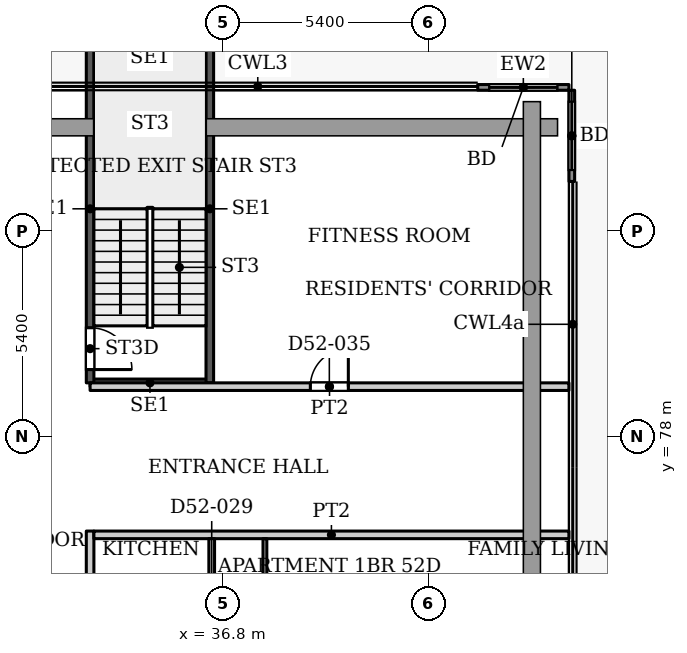
"""IFC4 building model, lengths in metres.
Left out: names, types, materials, properties, quantities, classifications, styles, units other than length and angle.
Written with IfcOpenShell. Run it as: python <this file> out.ifc"""

import sys

from ifc_helpers import new_model, si_unit, direction, frame, frame_2d, origin, place, context, subcontext, project, spatial, rectangle, extrude, source, transform, mapped, element, fill, save


model = new_model("IFC4")
c1 = context("Model", 3, precision=1e-05, world=origin(), true_north=direction((0.0, 1.0)))
c2 = subcontext(c1, "Body", "Model", "MODEL_VIEW")
j1 = project(units=[si_unit("LENGTHUNIT", "METRE"), si_unit("PLANEANGLEUNIT", "RADIAN")], contexts=[c1])
p1 = place(None, origin())
s1 = spatial("IfcSite", under=j1, at=p1, CompositionType="ELEMENT")
p2 = place(p1, origin())
s2 = spatial("IfcBuilding", under=s1, at=p2, CompositionType="ELEMENT")
p3 = place(p2, frame((0.0, 0.0, 224.0)))
s3 = spatial("IfcBuildingStorey", under=s2, at=p3, CompositionType="ELEMENT", Elevation=224.0)
p4 = place(p3, frame((43.5, 87.175, 0.0), z_axis=(0.0, 0.0, 1.0), x_axis=(1.0, 0.0, 0.0)))
e1 = element("IfcWall", 1, at=p4, inside=s3, PredefinedType="SOLIDWALL", context=c2, shape_type="SweptSolid", body=[
    extrude(rectangle(XDim=2.4, YDim=0.15, at=frame_2d((1.2, 0.0))), origin(), (0.0, 0.0, 1.0), 3.75),
])
p5 = place(p4, frame((0.3, 0.0, 0.0)))
e2 = element("IfcOpeningElement", 2, at=p5, cuts=e1, PredefinedType="OPENING", context=c2, shape_type="SweptSolid", body=[
    extrude(rectangle(XDim=1.8, YDim=2.4, at=frame_2d((0.9, 1.2))), frame((0.0, 0.085, 0.0), z_axis=(0.0, -1.0, 0.0), x_axis=(1.0, 0.0, 0.0)), (0.0, 0.0, 1.0), 0.17),
])
p6 = place(p3, frame((45.975, 87.1, 0.0), z_axis=(0.0, 0.0, 1.0), x_axis=(0.0, -1.0, 0.0)))
e3 = element("IfcWall", 3, at=p6, inside=s3, PredefinedType="SOLIDWALL", context=c2, shape_type="SweptSolid", body=[
    extrude(rectangle(XDim=2.4, YDim=0.15, at=frame_2d((1.2, 0.0))), origin(), (0.0, 0.0, 1.0), 3.75),
])
p7 = place(p6, frame((0.3, 0.0, 0.0)))
e4 = element("IfcOpeningElement", 4, at=p7, cuts=e3, PredefinedType="OPENING", context=c2, shape_type="SweptSolid", body=[
    extrude(rectangle(XDim=1.8, YDim=2.4, at=frame_2d((0.9, 1.2))), frame((0.0, 0.085, 0.0), z_axis=(0.0, -1.0, 0.0), x_axis=(1.0, 0.0, 0.0)), (0.0, 0.0, 1.0), 0.17),
])
p8 = place(p3, frame((33.3, 79.4, 0.0), z_axis=(0.0, 0.0, 1.0), x_axis=(1.0, 0.0, 0.0)))
e5 = element("IfcWall", 5, at=p8, inside=s3, PredefinedType="SHEAR", context=c2, shape_type="SweptSolid", body=[
    extrude(rectangle(XDim=3.15, YDim=0.2, at=frame_2d((1.575, 0.0))), origin(), (0.0, 0.0, 1.0), 3.9),
])
p9 = place(p3, frame((33.3, 79.4, 0.0), z_axis=(0.0, 0.0, 1.0), x_axis=(0.0, 1.0, 0.0)))
e6 = element("IfcWall", 6, at=p9, inside=s3, PredefinedType="SHEAR", context=c2, shape_type="SweptSolid", body=[
    extrude(rectangle(XDim=9.16, YDim=0.2, at=frame_2d((4.58, 0.0))), origin(), (0.0, 0.0, 1.0), 3.9),
])
p10 = place(p9, frame((0.35, 0.0, 0.0)))
e7 = element("IfcOpeningElement", 7, at=p10, cuts=e6, PredefinedType="OPENING", context=c2, shape_type="SweptSolid", body=[
    extrude(rectangle(XDim=1.1, YDim=2.2, at=frame_2d((0.55, 1.1))), frame((0.0, 0.11, 0.0), z_axis=(0.0, -1.0, 0.0), x_axis=(1.0, 0.0, 0.0)), (0.0, 0.0, 1.0), 0.22),
])
p11 = place(p3, frame((36.45, 79.4, 0.0), z_axis=(0.0, 0.0, 1.0), x_axis=(0.0, 1.0, 0.0)))
e8 = element("IfcWall", 8, at=p11, inside=s3, PredefinedType="SHEAR", context=c2, shape_type="SweptSolid", body=[
    extrude(rectangle(XDim=9.16, YDim=0.2, at=frame_2d((4.58, 0.0))), origin(), (0.0, 0.0, 1.0), 3.9),
])
p12 = place(p3, frame((33.3, 57.9, 0.0), z_axis=(0.0, 0.0, 1.0), x_axis=(0.0, 1.0, 0.0)))
e9 = element("IfcWall", 9, at=p12, inside=s3, PredefinedType="PARTITIONING", context=c2, shape_type="SweptSolid", body=[
    extrude(rectangle(XDim=17.6, YDim=0.2, at=frame_2d((8.8, 0.0))), origin(), (0.0, 0.0, 1.0), 3.6),
])
p13 = place(p12, frame((0.5, 0.0, 0.0)))
e10 = element("IfcOpeningElement", 10, at=p13, cuts=e9, PredefinedType="OPENING", context=c2, shape_type="SweptSolid", body=[
    extrude(rectangle(XDim=1.0, YDim=2.1, at=frame_2d((0.5, 1.05))), frame((0.0, 0.11, 0.0), z_axis=(0.0, -1.0, 0.0), x_axis=(1.0, 0.0, 0.0)), (0.0, 0.0, 1.0), 0.22),
])
p14 = place(p12, frame((9.2, 0.0, 0.0)))
e11 = element("IfcOpeningElement", 11, at=p14, cuts=e9, PredefinedType="OPENING", context=c2, shape_type="SweptSolid", body=[
    extrude(rectangle(XDim=1.0, YDim=2.1, at=frame_2d((0.5, 1.05))), frame((0.0, 0.11, 0.0), z_axis=(0.0, -1.0, 0.0), x_axis=(1.0, 0.0, 0.0)), (0.0, 0.0, 1.0), 0.22),
])
p15 = place(p3, frame((33.3, 79.3, 0.0), z_axis=(0.0, 0.0, 1.0), x_axis=(1.0, 0.0, 0.0)))
e12 = element("IfcWall", 12, at=p15, inside=s3, PredefinedType="PARTITIONING", context=c2, shape_type="SweptSolid", body=[
    extrude(rectangle(XDim=12.6, YDim=0.2, at=frame_2d((6.3, 0.0))), origin(), (0.0, 0.0, 1.0), 3.6),
])
p16 = place(p15, frame((5.795, 0.0, 0.0)))
e13 = element("IfcOpeningElement", 13, at=p16, cuts=e12, PredefinedType="OPENING", context=c2, shape_type="SweptSolid", body=[
    extrude(rectangle(XDim=1.0, YDim=2.1, at=frame_2d((0.5, 1.05))), frame((0.0, 0.11, 0.0), z_axis=(0.0, -1.0, 0.0), x_axis=(1.0, 0.0, 0.0)), (0.0, 0.0, 1.0), 0.22),
])
p17 = place(p3, frame((33.4, 75.4, 0.0), z_axis=(0.0, 0.0, 1.0), x_axis=(1.0, 0.0, 0.0)))
e14 = element("IfcWall", 14, at=p17, inside=s3, PredefinedType="PARTITIONING", context=c2, shape_type="SweptSolid", body=[
    extrude(rectangle(XDim=12.5, YDim=0.2, at=frame_2d((6.25, 0.0))), origin(), (0.0, 0.0, 1.0), 3.6),
])
p18 = place(p3, frame((36.5, 68.425, 0.0), z_axis=(0.0, 0.0, 1.0), x_axis=(0.0, 1.0, 0.0)))
e15 = element("IfcWall", 15, at=p18, inside=s3, PredefinedType="PARTITIONING", context=c2, shape_type="SweptSolid", body=[
    extrude(rectangle(XDim=6.875, YDim=0.15, at=frame_2d((3.438, 0.0))), origin(), (0.0, 0.0, 1.0), 3.6),
])
p19 = place(p18, frame((2.375, 0.0, 0.0)))
e16 = element("IfcOpeningElement", 16, at=p19, cuts=e15, PredefinedType="OPENING", context=c2, shape_type="SweptSolid", body=[
    extrude(rectangle(XDim=0.8, YDim=2.1, at=frame_2d((0.4, 1.05))), frame((0.0, 0.085, 0.0), z_axis=(0.0, -1.0, 0.0), x_axis=(1.0, 0.0, 0.0)), (0.0, 0.0, 1.0), 0.17),
])
p20 = place(p18, frame((5.025, 0.0, 0.0)))
e17 = element("IfcOpeningElement", 17, at=p20, cuts=e15, PredefinedType="OPENING", context=c2, shape_type="SweptSolid", body=[
    extrude(rectangle(XDim=0.9, YDim=2.1, at=frame_2d((0.45, 1.05))), frame((0.0, 0.085, 0.0), z_axis=(0.0, -1.0, 0.0), x_axis=(1.0, 0.0, 0.0)), (0.0, 0.0, 1.0), 0.17),
])
p21 = place(p18, frame((0.425, 0.0, 0.0)))
e18 = element("IfcOpeningElement", 18, at=p21, cuts=e15, PredefinedType="OPENING", context=c2, shape_type="SweptSolid", body=[
    extrude(rectangle(XDim=0.8, YDim=2.1, at=frame_2d((0.4, 1.05))), frame((0.0, 0.085, 0.0), z_axis=(0.0, -1.0, 0.0), x_axis=(1.0, 0.0, 0.0)), (0.0, 0.0, 1.0), 0.17),
])
p22 = place(p3, frame((37.9, 66.8, 0.0), z_axis=(0.0, 0.0, 1.0), x_axis=(0.0, 1.0, 0.0)))
e19 = element("IfcWall", 19, at=p22, inside=s3, PredefinedType="PARTITIONING", context=c2, shape_type="SweptSolid", body=[
    extrude(rectangle(XDim=8.5, YDim=0.1, at=frame_2d((4.25, 0.0))), origin(), (0.0, 0.0, 1.0), 3.6),
])
p23 = place(p22, frame((6.2, 0.0, 0.0)))
e20 = element("IfcOpeningElement", 20, at=p23, cuts=e19, PredefinedType="OPENING", context=c2, shape_type="SweptSolid", body=[
    extrude(rectangle(XDim=0.9, YDim=2.1, at=frame_2d((0.45, 1.05))), frame((0.0, 0.06, 0.0), z_axis=(0.0, -1.0, 0.0), x_axis=(1.0, 0.0, 0.0)), (0.0, 0.0, 1.0), 0.12),
])
p24 = place(p22, frame((1.8, 0.0, 0.0)))
e21 = element("IfcOpeningElement", 21, at=p24, cuts=e19, PredefinedType="OPENING", context=c2, shape_type="SweptSolid", body=[
    extrude(rectangle(XDim=1.0, YDim=2.1, at=frame_2d((0.5, 1.05))), frame((0.0, 0.06, 0.0), z_axis=(0.0, -1.0, 0.0), x_axis=(1.0, 0.0, 0.0)), (0.0, 0.0, 1.0), 0.12),
])
m1 = source(origin(), c2, "Body", "SweptSolid", [
    extrude(rectangle(XDim=1.8, YDim=2.4, at=frame_2d((0.9, 1.2))), frame((0.0, 0.025, 0.0), z_axis=(0.0, -1.0, 0.0), x_axis=(1.0, 0.0, 0.0)), (0.0, 0.0, 1.0), 0.05),
])
p25 = place(p5, origin())
e22 = element("IfcDoor", 22, at=p25, inside=s3, OperationType="SLIDING_TO_LEFT", PredefinedType="DOOR", context=c2, shape_type="MappedRepresentation", body=[
    mapped(m1, transform((0.0, 0.0, 0.0), x_axis=(1.0, 0.0, 0.0), y_axis=(0.0, 1.0, 0.0), z_axis=(0.0, 0.0, 1.0), scale=1.0)),
])
fill(e2, e22)
p26 = place(p7, origin())
e23 = element("IfcDoor", 23, at=p26, inside=s3, OperationType="SLIDING_TO_LEFT", PredefinedType="DOOR", context=c2, shape_type="MappedRepresentation", body=[
    mapped(m1, transform((0.0, 0.0, 0.0), x_axis=(1.0, 0.0, 0.0), y_axis=(0.0, 1.0, 0.0), z_axis=(0.0, 0.0, 1.0), scale=1.0)),
])
fill(e4, e23)
m2 = source(origin(), c2, "Body", "SweptSolid", [
    extrude(rectangle(XDim=1.1, YDim=2.2, at=frame_2d((0.55, 1.1))), frame((0.0, 0.025, 0.0), z_axis=(0.0, -1.0, 0.0), x_axis=(1.0, 0.0, 0.0)), (0.0, 0.0, 1.0), 0.05),
])
p27 = place(p10, origin())
e24 = element("IfcDoor", 24, at=p27, inside=s3, OperationType="SINGLE_SWING_RIGHT", PredefinedType="DOOR", context=c2, shape_type="MappedRepresentation", body=[
    mapped(m2, transform((0.0, 0.0, 0.0), x_axis=(1.0, 0.0, 0.0), y_axis=(0.0, 1.0, 0.0), z_axis=(0.0, 0.0, 1.0), scale=1.0)),
])
fill(e7, e24)
m3 = source(origin(), c2, "Body", "SweptSolid", [
    extrude(rectangle(XDim=1.0, YDim=2.1, at=frame_2d((0.5, 1.05))), frame((0.0, 0.025, 0.0), z_axis=(0.0, -1.0, 0.0), x_axis=(1.0, 0.0, 0.0)), (0.0, 0.0, 1.0), 0.05),
])
p28 = place(p16, origin())
e25 = element("IfcDoor", 25, at=p28, inside=s3, OperationType="SINGLE_SWING_LEFT", PredefinedType="DOOR", context=c2, shape_type="MappedRepresentation", body=[
    mapped(m3, transform((0.0, 0.0, 0.0), x_axis=(1.0, 0.0, 0.0), y_axis=(0.0, 1.0, 0.0), z_axis=(0.0, 0.0, 1.0), scale=1.0)),
])
fill(e13, e25)
save(model, sys.argv[1])
